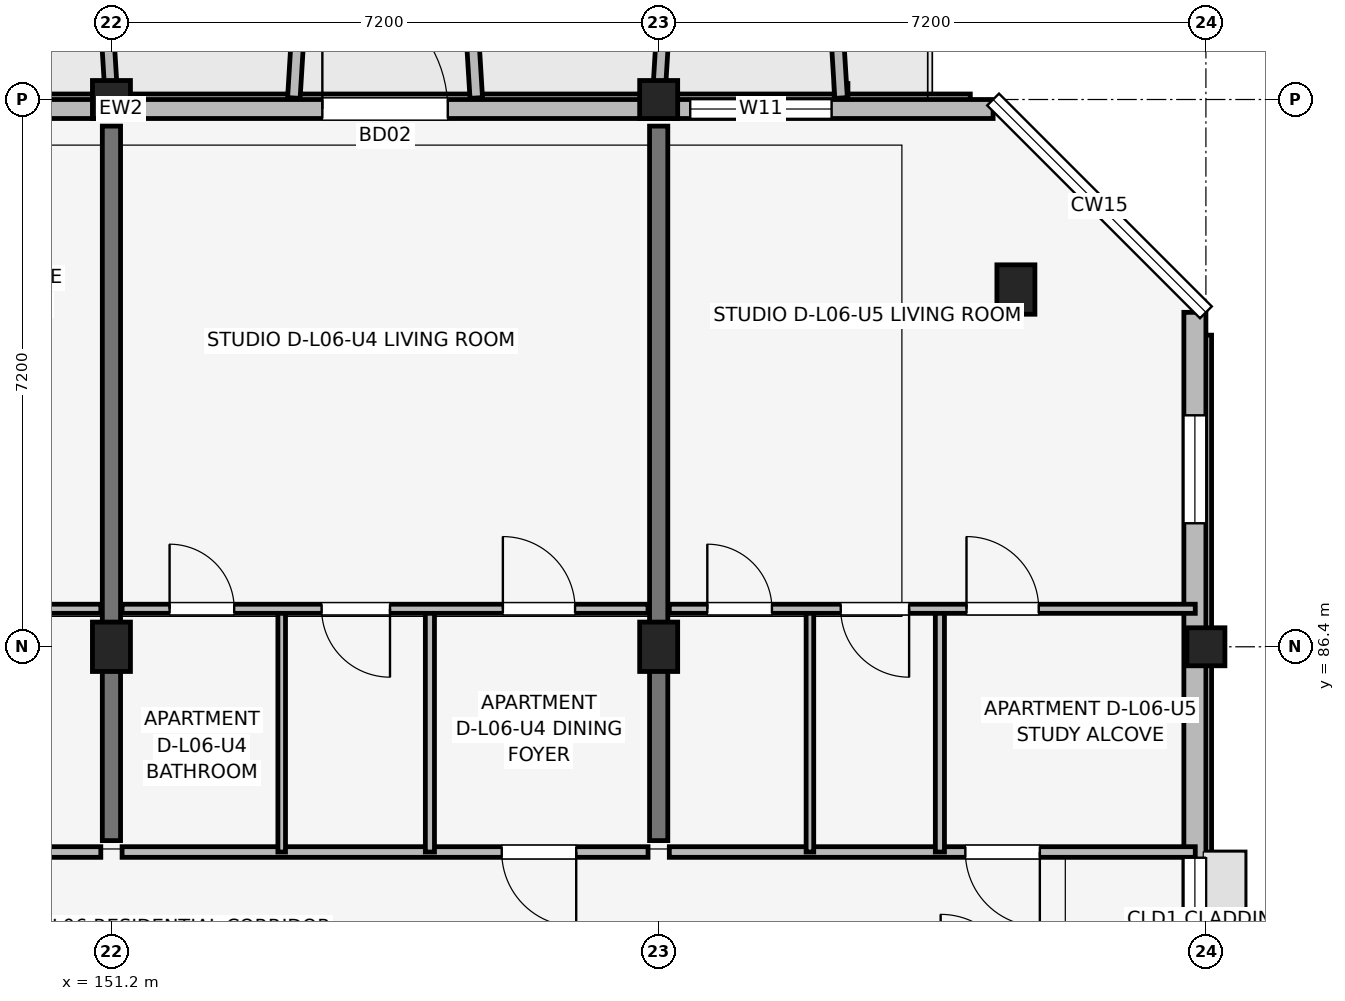
"""IFC4 building model, lengths in metres.
Left out: names, types, materials, properties, quantities, classifications, styles, units other than length and angle.
Written with IfcOpenShell. Run it as: python <this file> out.ifc"""

import sys

from ifc_helpers import new_model, si_unit, direction, frame, frame_2d, origin, origin_2d, place, context, subcontext, project, spatial, rectangle, extrude, element, fill, save


model = new_model("IFC4")
c1 = context("Model", 3, precision=1e-05, world=origin(), true_north=direction((0.0, 1.0)))
c2 = subcontext(c1, "Body", "Model", "MODEL_VIEW")
j1 = project(units=[si_unit("LENGTHUNIT", "METRE"), si_unit("PLANEANGLEUNIT", "RADIAN")], contexts=[c1])
p1 = place(None, origin())
s1 = spatial("IfcSite", under=j1, at=p1, CompositionType="ELEMENT")
p2 = place(p1, origin())
s2 = spatial("IfcBuilding", under=s1, at=p2, CompositionType="ELEMENT")
p3 = place(p2, frame((0.0, 0.0, 21.3)))
s3 = spatial("IfcBuildingStorey", under=s2, at=p3, CompositionType="ELEMENT", Elevation=21.3)
p4 = place(p3, frame((151.2, 86.4, 0.0), z_axis=(0.0, 0.0, 1.0), x_axis=(1.0, 0.0, 0.0)))
e1 = element("IfcColumn", 1, at=p4, inside=s3, PredefinedType="COLUMN", context=c2, shape_type="SweptSolid", body=[
    extrude(rectangle(XDim=0.5, YDim=0.65, at=origin_2d()), origin(), (0.0, 0.0, 1.0), 3.15),
])
p5 = place(p3, frame((151.2, 93.6, 0.0), z_axis=(0.0, 0.0, 1.0), x_axis=(1.0, 0.0, 0.0)))
e2 = element("IfcColumn", 2, at=p5, inside=s3, PredefinedType="COLUMN", context=c2, shape_type="SweptSolid", body=[
    extrude(rectangle(XDim=0.5, YDim=0.5, at=origin_2d()), origin(), (0.0, 0.0, 1.0), 3.15),
])
p6 = place(p3, frame((158.4, 86.4, 0.0), z_axis=(0.0, 0.0, 1.0), x_axis=(1.0, 0.0, 0.0)))
e3 = element("IfcColumn", 3, at=p6, inside=s3, PredefinedType="COLUMN", context=c2, shape_type="SweptSolid", body=[
    extrude(rectangle(XDim=0.5, YDim=0.65, at=origin_2d()), origin(), (0.0, 0.0, 1.0), 3.15),
])
for number, where, z_axis, x_axis in (
    (4, (158.4, 93.6, 0.0), (0.0, 0.0, 1.0), (1.0, 0.0, 0.0)),
    (5, (165.6, 86.4, 0.0), (0.0, 0.0, 1.0), (1.0, 0.0, 0.0)),
):
    element("IfcColumn", number, at=place(p3, frame(where, z_axis=z_axis, x_axis=x_axis)), inside=s3, PredefinedType="COLUMN", context=c2, shape_type="SweptSolid", body=[
        extrude(rectangle(XDim=0.5, YDim=0.5, at=origin_2d()), origin(), (0.0, 0.0, 1.0), 3.15),
    ])
p7 = place(p3, frame((163.1, 91.1, 0.0), z_axis=(0.0, 0.0, 1.0), x_axis=(1.0, 0.0, 0.0)))
e6 = element("IfcColumn", 6, at=p7, inside=s3, PredefinedType="COLUMN", context=c2, shape_type="SweptSolid", body=[
    extrude(rectangle(XDim=0.5, YDim=0.65, at=origin_2d()), origin(), (0.0, 0.0, 1.0), 3.15),
])
for number, where, z_axis, x_axis in (
    (7, (151.2, 83.85, 0.0), (0.0, 0.0, 1.0), (0.0, 1.0, 0.0)),
    (8, (158.4, 83.85, 0.0), (0.0, 0.0, 1.0), (0.0, 1.0, 0.0)),
):
    element("IfcWall", number, at=place(p3, frame(where, z_axis=z_axis, x_axis=x_axis)), inside=s3, PredefinedType="SHEAR", context=c2, shape_type="SweptSolid", body=[
        extrude(rectangle(XDim=9.4, YDim=0.24, at=frame_2d((4.7, 0.0))), origin(), (0.0, 0.0, 1.0), 3.15),
    ])
p8 = place(p3, frame((165.455, 74.8, 0.0), z_axis=(0.0, 0.0, 1.0), x_axis=(0.0, 1.0, 0.0)))
e9 = element("IfcWall", 9, at=p8, inside=s3, PredefinedType="SOLIDWALL", context=c2, shape_type="SweptSolid", body=[
    extrude(rectangle(XDim=16.0, YDim=0.29, at=frame_2d((8.0, 0.0))), origin(), (0.0, 0.0, 1.0), 2.43),
])
p9 = place(p8, frame((7.175, 0.0, 1.05)))
e10 = element("IfcOpeningElement", 10, at=p9, cuts=e9, PredefinedType="OPENING", context=c2, shape_type="SweptSolid", body=[
    extrude(rectangle(XDim=1.65, YDim=1.15, at=frame_2d((0.825, 0.575))), frame((0.0, 0.155, 0.0), z_axis=(0.0, -1.0, 0.0), x_axis=(1.0, 0.0, 0.0)), (0.0, 0.0, 1.0), 0.31),
])
p10 = place(p8, frame((13.225, 0.0, 0.72)))
e11 = element("IfcOpeningElement", 11, at=p10, cuts=e9, PredefinedType="OPENING", context=c2, shape_type="SweptSolid", body=[
    extrude(rectangle(XDim=1.42, YDim=1.6, at=frame_2d((0.71, 0.8))), frame((0.0, 0.155, 0.0), z_axis=(0.0, -1.0, 0.0), x_axis=(1.0, 0.0, 0.0)), (0.0, 0.0, 1.0), 0.31),
])
p11 = place(p3, frame((162.8, 93.475, 0.0), z_axis=(0.0, 0.0, 1.0), x_axis=(-1.0, 0.0, 0.0)))
e12 = element("IfcWall", 12, at=p11, inside=s3, PredefinedType="SOLIDWALL", context=c2, shape_type="SweptSolid", body=[
    extrude(rectangle(XDim=30.4, YDim=0.25, at=frame_2d((15.2, 0.0))), origin(), (0.0, 0.0, 1.0), 2.43),
])
p12 = place(p11, frame((23.3, 0.0, 0.0), z_axis=(0.0, 0.0, 1.0), x_axis=(-1.0, 0.0, 0.0)))
e13 = element("IfcOpeningElement", 13, at=p12, cuts=e12, PredefinedType="OPENING", context=c2, shape_type="SweptSolid", body=[
    extrude(rectangle(XDim=1.8, YDim=2.15, at=frame_2d((0.9, 1.075))), frame((0.0, 0.135, 0.0), z_axis=(0.0, -1.0, 0.0), x_axis=(1.0, 0.0, 0.0)), (0.0, 0.0, 1.0), 0.27),
])
p13 = place(p11, frame((8.825, 0.0, 0.0), z_axis=(0.0, 0.0, 1.0), x_axis=(-1.0, 0.0, 0.0)))
e14 = element("IfcOpeningElement", 14, at=p13, cuts=e12, PredefinedType="OPENING", context=c2, shape_type="SweptSolid", body=[
    extrude(rectangle(XDim=1.65, YDim=2.15, at=frame_2d((0.825, 1.075))), frame((0.0, 0.135, 0.0), z_axis=(0.0, -1.0, 0.0), x_axis=(1.0, 0.0, 0.0)), (0.0, 0.0, 1.0), 0.27),
])
p14 = place(p11, frame((26.985, 0.0, 0.75)))
e15 = element("IfcOpeningElement", 15, at=p14, cuts=e12, PredefinedType="OPENING", context=c2, shape_type="SweptSolid", body=[
    extrude(rectangle(XDim=0.72, YDim=1.35, at=frame_2d((0.36, 0.675))), frame((0.0, 0.135, 0.0), z_axis=(0.0, -1.0, 0.0), x_axis=(1.0, 0.0, 0.0)), (0.0, 0.0, 1.0), 0.27),
])
p15 = place(p11, frame((17.115, 0.0, 0.75)))
e16 = element("IfcOpeningElement", 16, at=p15, cuts=e12, PredefinedType="OPENING", context=c2, shape_type="SweptSolid", body=[
    extrude(rectangle(XDim=0.85, YDim=1.4, at=frame_2d((0.425, 0.7))), frame((0.0, 0.135, 0.0), z_axis=(0.0, -1.0, 0.0), x_axis=(1.0, 0.0, 0.0)), (0.0, 0.0, 1.0), 0.27),
])
p16 = place(p11, frame((14.125, 0.0, 0.67)))
e17 = element("IfcOpeningElement", 17, at=p16, cuts=e12, PredefinedType="OPENING", context=c2, shape_type="SweptSolid", body=[
    extrude(rectangle(XDim=2.15, YDim=1.65, at=frame_2d((1.075, 0.825))), frame((0.0, 0.135, 0.0), z_axis=(0.0, -1.0, 0.0), x_axis=(1.0, 0.0, 0.0)), (0.0, 0.0, 1.0), 0.27),
])
p17 = place(p11, frame((2.125, 0.0, 0.7)))
e18 = element("IfcOpeningElement", 18, at=p17, cuts=e12, PredefinedType="OPENING", context=c2, shape_type="SweptSolid", body=[
    extrude(rectangle(XDim=1.86, YDim=1.6, at=frame_2d((0.93, 0.8))), frame((0.0, 0.135, 0.0), z_axis=(0.0, -1.0, 0.0), x_axis=(1.0, 0.0, 0.0)), (0.0, 0.0, 1.0), 0.27),
])
p18 = place(p3, frame((151.2, 93.62, 0.0), z_axis=(0.0, 0.0, 1.0), x_axis=(-0.061046865508, 0.998134900808, 0.0)))
e19 = element("IfcWall", 19, at=p18, inside=s3, PredefinedType="ELEMENTEDWALL", context=c2, shape_type="SweptSolid", body=[
    extrude(rectangle(XDim=1.964, YDim=0.165, at=frame_2d((0.982, 0.0))), origin(), (0.0, 0.0, 1.0), 2.95),
])
for number, where, z_axis, x_axis in (
    (20, (153.6, 93.62, 0.0), (0.0, 0.0, 1.0), (0.061, 0.998, 0.0)),
    (21, (156.0, 93.62, 0.0), (0.0, 0.0, 1.0), (-0.061, 0.998, 0.0)),
):
    element("IfcWall", number, at=place(p3, frame(where, z_axis=z_axis, x_axis=x_axis)), inside=s3, PredefinedType="ELEMENTEDWALL", context=c2, shape_type="SweptSolid", body=[
        extrude(rectangle(XDim=1.964, YDim=0.165, at=frame_2d((0.982, 0.0))), origin(), (0.0, 0.0, 1.0), 2.48),
    ])
for number, where, z_axis, x_axis in (
    (22, (158.4, 93.62, 0.0), (0.0, 0.0, 1.0), (0.061, 0.998, 0.0)),
    (23, (160.8, 93.62, 0.0), (0.0, 0.0, 1.0), (-0.061, 0.998, 0.0)),
):
    element("IfcWall", number, at=place(p3, frame(where, z_axis=z_axis, x_axis=x_axis)), inside=s3, PredefinedType="ELEMENTEDWALL", context=c2, shape_type="SweptSolid", body=[
        extrude(rectangle(XDim=1.964, YDim=0.165, at=frame_2d((0.982, 0.0))), origin(), (0.0, 0.0, 1.0), 2.95),
    ])
p19 = place(p3, frame((144.14, 83.7, 0.0), z_axis=(0.0, 0.0, 1.0), x_axis=(1.0, 0.0, 0.0)))
e24 = element("IfcWall", 24, at=p19, inside=s3, PredefinedType="PARTITIONING", context=c2, shape_type="SweptSolid", body=[
    extrude(rectangle(XDim=6.92, YDim=0.14, at=frame_2d((3.46, 0.0))), origin(), (0.0, 0.0, 1.0), 2.38),
])
p20 = place(p19, frame((5.145, 0.0, 0.0)))
e25 = element("IfcOpeningElement", 25, at=p20, cuts=e24, PredefinedType="OPENING", context=c2, shape_type="SweptSolid", body=[
    extrude(rectangle(XDim=0.98, YDim=2.1, at=frame_2d((0.49, 1.05))), frame((0.0, 0.08, 0.0), z_axis=(0.0, -1.0, 0.0), x_axis=(1.0, 0.0, 0.0)), (0.0, 0.0, 1.0), 0.16),
])
p21 = place(p3, frame((144.14, 86.9, 0.0), z_axis=(0.0, 0.0, 1.0), x_axis=(1.0, 0.0, 0.0)))
e26 = element("IfcWall", 26, at=p21, inside=s3, PredefinedType="PARTITIONING", context=c2, shape_type="SweptSolid", body=[
    extrude(rectangle(XDim=6.92, YDim=0.12, at=frame_2d((3.46, 0.0))), origin(), (0.0, 0.0, 1.0), 2.38),
])
p22 = place(p21, frame((1.475, 0.0, 0.0), z_axis=(0.0, 0.0, 1.0), x_axis=(-1.0, 0.0, 0.0)))
e27 = element("IfcOpeningElement", 27, at=p22, cuts=e26, PredefinedType="OPENING", context=c2, shape_type="SweptSolid", body=[
    extrude(rectangle(XDim=0.85, YDim=2.08, at=frame_2d((0.425, 1.04))), frame((0.0, 0.07, 0.0), z_axis=(0.0, -1.0, 0.0), x_axis=(1.0, 0.0, 0.0)), (0.0, 0.0, 1.0), 0.14),
])
p23 = place(p21, frame((2.775, 0.0, 0.0)))
e28 = element("IfcOpeningElement", 28, at=p23, cuts=e26, PredefinedType="OPENING", context=c2, shape_type="SweptSolid", body=[
    extrude(rectangle(XDim=0.9, YDim=2.08, at=frame_2d((0.45, 1.04))), frame((0.0, 0.07, 0.0), z_axis=(0.0, -1.0, 0.0), x_axis=(1.0, 0.0, 0.0)), (0.0, 0.0, 1.0), 0.14),
])
p24 = place(p21, frame((6.11, 0.0, 0.0), z_axis=(0.0, 0.0, 1.0), x_axis=(-1.0, 0.0, 0.0)))
e29 = element("IfcOpeningElement", 29, at=p24, cuts=e26, PredefinedType="OPENING", context=c2, shape_type="SweptSolid", body=[
    extrude(rectangle(XDim=0.95, YDim=2.08, at=frame_2d((0.475, 1.04))), frame((0.0, 0.07, 0.0), z_axis=(0.0, -1.0, 0.0), x_axis=(1.0, 0.0, 0.0)), (0.0, 0.0, 1.0), 0.14),
])
p25 = place(p3, frame((151.34, 83.7, 0.0), z_axis=(0.0, 0.0, 1.0), x_axis=(1.0, 0.0, 0.0)))
e30 = element("IfcWall", 30, at=p25, inside=s3, PredefinedType="PARTITIONING", context=c2, shape_type="SweptSolid", body=[
    extrude(rectangle(XDim=6.92, YDim=0.14, at=frame_2d((3.46, 0.0))), origin(), (0.0, 0.0, 1.0), 2.38),
])
p26 = place(p25, frame((5.975, 0.0, 0.0), z_axis=(0.0, 0.0, 1.0), x_axis=(-1.0, 0.0, 0.0)))
e31 = element("IfcOpeningElement", 31, at=p26, cuts=e30, PredefinedType="OPENING", context=c2, shape_type="SweptSolid", body=[
    extrude(rectangle(XDim=0.98, YDim=2.1, at=frame_2d((0.49, 1.05))), frame((0.0, 0.08, 0.0), z_axis=(0.0, -1.0, 0.0), x_axis=(1.0, 0.0, 0.0)), (0.0, 0.0, 1.0), 0.16),
])
p27 = place(p3, frame((153.44, 83.7, 0.0), z_axis=(0.0, 0.0, 1.0), x_axis=(0.0, 1.0, 0.0)))
e32 = element("IfcWall", 32, at=p27, inside=s3, PredefinedType="PARTITIONING", context=c2, shape_type="SweptSolid", body=[
    extrude(rectangle(XDim=3.2, YDim=0.1, at=frame_2d((1.6, 0.0))), origin(), (0.0, 0.0, 1.0), 2.38),
])
p28 = place(p3, frame((155.39, 83.7, 0.0), z_axis=(0.0, 0.0, 1.0), x_axis=(0.0, 1.0, 0.0)))
e33 = element("IfcWall", 33, at=p28, inside=s3, PredefinedType="PARTITIONING", context=c2, shape_type="SweptSolid", body=[
    extrude(rectangle(XDim=3.2, YDim=0.12, at=frame_2d((1.6, 0.0))), origin(), (0.0, 0.0, 1.0), 2.38),
])
p29 = place(p3, frame((151.34, 86.9, 0.0), z_axis=(0.0, 0.0, 1.0), x_axis=(1.0, 0.0, 0.0)))
e34 = element("IfcWall", 34, at=p29, inside=s3, PredefinedType="PARTITIONING", context=c2, shape_type="SweptSolid", body=[
    extrude(rectangle(XDim=6.92, YDim=0.12, at=frame_2d((3.46, 0.0))), origin(), (0.0, 0.0, 1.0), 2.38),
])
p30 = place(p29, frame((0.625, 0.0, 0.0)))
e35 = element("IfcOpeningElement", 35, at=p30, cuts=e34, PredefinedType="OPENING", context=c2, shape_type="SweptSolid", body=[
    extrude(rectangle(XDim=0.85, YDim=2.08, at=frame_2d((0.425, 1.04))), frame((0.0, 0.07, 0.0), z_axis=(0.0, -1.0, 0.0), x_axis=(1.0, 0.0, 0.0)), (0.0, 0.0, 1.0), 0.14),
])
p31 = place(p29, frame((3.525, 0.0, 0.0), z_axis=(0.0, 0.0, 1.0), x_axis=(-1.0, 0.0, 0.0)))
e36 = element("IfcOpeningElement", 36, at=p31, cuts=e34, PredefinedType="OPENING", context=c2, shape_type="SweptSolid", body=[
    extrude(rectangle(XDim=0.9, YDim=2.08, at=frame_2d((0.45, 1.04))), frame((0.0, 0.07, 0.0), z_axis=(0.0, -1.0, 0.0), x_axis=(1.0, 0.0, 0.0)), (0.0, 0.0, 1.0), 0.14),
])
p32 = place(p29, frame((5.01, 0.0, 0.0)))
e37 = element("IfcOpeningElement", 37, at=p32, cuts=e34, PredefinedType="OPENING", context=c2, shape_type="SweptSolid", body=[
    extrude(rectangle(XDim=0.95, YDim=2.08, at=frame_2d((0.475, 1.04))), frame((0.0, 0.07, 0.0), z_axis=(0.0, -1.0, 0.0), x_axis=(1.0, 0.0, 0.0)), (0.0, 0.0, 1.0), 0.14),
])
p33 = place(p3, frame((158.54, 83.7, 0.0), z_axis=(0.0, 0.0, 1.0), x_axis=(1.0, 0.0, 0.0)))
e38 = element("IfcWall", 38, at=p33, inside=s3, PredefinedType="PARTITIONING", context=c2, shape_type="SweptSolid", body=[
    extrude(rectangle(XDim=6.92, YDim=0.14, at=frame_2d((3.46, 0.0))), origin(), (0.0, 0.0, 1.0), 2.38),
])
p34 = place(p33, frame((4.875, 0.0, 0.0), z_axis=(0.0, 0.0, 1.0), x_axis=(-1.0, 0.0, 0.0)))
e39 = element("IfcOpeningElement", 39, at=p34, cuts=e38, PredefinedType="OPENING", context=c2, shape_type="SweptSolid", body=[
    extrude(rectangle(XDim=0.98, YDim=2.1, at=frame_2d((0.49, 1.05))), frame((0.0, 0.08, 0.0), z_axis=(0.0, -1.0, 0.0), x_axis=(1.0, 0.0, 0.0)), (0.0, 0.0, 1.0), 0.16),
])
p35 = place(p3, frame((160.39, 83.7, 0.0), z_axis=(0.0, 0.0, 1.0), x_axis=(0.0, 1.0, 0.0)))
e40 = element("IfcWall", 40, at=p35, inside=s3, PredefinedType="PARTITIONING", context=c2, shape_type="SweptSolid", body=[
    extrude(rectangle(XDim=3.2, YDim=0.1, at=frame_2d((1.6, 0.0))), origin(), (0.0, 0.0, 1.0), 2.38),
])
p36 = place(p3, frame((162.1, 83.7, 0.0), z_axis=(0.0, 0.0, 1.0), x_axis=(0.0, 1.0, 0.0)))
e41 = element("IfcWall", 41, at=p36, inside=s3, PredefinedType="PARTITIONING", context=c2, shape_type="SweptSolid", body=[
    extrude(rectangle(XDim=3.2, YDim=0.12, at=frame_2d((1.6, 0.0))), origin(), (0.0, 0.0, 1.0), 2.38),
])
p37 = place(p3, frame((158.54, 86.9, 0.0), z_axis=(0.0, 0.0, 1.0), x_axis=(1.0, 0.0, 0.0)))
e42 = element("IfcWall", 42, at=p37, inside=s3, PredefinedType="PARTITIONING", context=c2, shape_type="SweptSolid", body=[
    extrude(rectangle(XDim=6.92, YDim=0.12, at=frame_2d((3.46, 0.0))), origin(), (0.0, 0.0, 1.0), 2.38),
])
p38 = place(p37, frame((0.5, 0.0, 0.0)))
e43 = element("IfcOpeningElement", 43, at=p38, cuts=e42, PredefinedType="OPENING", context=c2, shape_type="SweptSolid", body=[
    extrude(rectangle(XDim=0.85, YDim=2.08, at=frame_2d((0.425, 1.04))), frame((0.0, 0.07, 0.0), z_axis=(0.0, -1.0, 0.0), x_axis=(1.0, 0.0, 0.0)), (0.0, 0.0, 1.0), 0.14),
])
p39 = place(p37, frame((3.155, 0.0, 0.0), z_axis=(0.0, 0.0, 1.0), x_axis=(-1.0, 0.0, 0.0)))
e44 = element("IfcOpeningElement", 44, at=p39, cuts=e42, PredefinedType="OPENING", context=c2, shape_type="SweptSolid", body=[
    extrude(rectangle(XDim=0.9, YDim=2.08, at=frame_2d((0.45, 1.04))), frame((0.0, 0.07, 0.0), z_axis=(0.0, -1.0, 0.0), x_axis=(1.0, 0.0, 0.0)), (0.0, 0.0, 1.0), 0.14),
])
p40 = place(p37, frame((3.91, 0.0, 0.0)))
e45 = element("IfcOpeningElement", 45, at=p40, cuts=e42, PredefinedType="OPENING", context=c2, shape_type="SweptSolid", body=[
    extrude(rectangle(XDim=0.95, YDim=2.08, at=frame_2d((0.475, 1.04))), frame((0.0, 0.07, 0.0), z_axis=(0.0, -1.0, 0.0), x_axis=(1.0, 0.0, 0.0)), (0.0, 0.0, 1.0), 0.14),
])
p41 = place(p13, origin())
e46 = element("IfcDoor", 46, at=p41, inside=s3, OperationType="SINGLE_SWING_RIGHT", PredefinedType="DOOR", context=c2, shape_type="SweptSolid", body=[
    extrude(rectangle(XDim=1.65, YDim=2.15, at=frame_2d((0.825, 1.075))), frame((0.0, 0.025, 0.0), z_axis=(0.0, -1.0, 0.0), x_axis=(1.0, 0.0, 0.0)), (0.0, 0.0, 1.0), 0.05),
])
fill(e14, e46)
p42 = place(p17, origin())
e47 = element("IfcWindow", 47, at=p42, inside=s3, PartitioningType="SINGLE_PANEL", PredefinedType="WINDOW", context=c2, shape_type="SweptSolid", body=[
    extrude(rectangle(XDim=1.86, YDim=1.6, at=frame_2d((0.93, 0.8))), frame((0.0, 0.03, 0.0), z_axis=(0.0, -1.0, 0.0), x_axis=(1.0, 0.0, 0.0)), (0.0, 0.0, 1.0), 0.06),
])
fill(e18, e47)
p43 = place(p9, origin())
e48 = element("IfcWindow", 48, at=p43, inside=s3, PartitioningType="SINGLE_PANEL", PredefinedType="WINDOW", context=c2, shape_type="SweptSolid", body=[
    extrude(rectangle(XDim=1.65, YDim=1.15, at=frame_2d((0.825, 0.575))), frame((0.0, 0.03, 0.0), z_axis=(0.0, -1.0, 0.0), x_axis=(1.0, 0.0, 0.0)), (0.0, 0.0, 1.0), 0.06),
])
fill(e10, e48)
p44 = place(p10, origin())
e49 = element("IfcWindow", 49, at=p44, inside=s3, PartitioningType="SINGLE_PANEL", PredefinedType="WINDOW", context=c2, shape_type="SweptSolid", body=[
    extrude(rectangle(XDim=1.42, YDim=1.6, at=frame_2d((0.71, 0.8))), frame((0.0, 0.03, 0.0), z_axis=(0.0, -1.0, 0.0), x_axis=(1.0, 0.0, 0.0)), (0.0, 0.0, 1.0), 0.06),
])
fill(e11, e49)
p45 = place(p26, origin())
e50 = element("IfcDoor", 50, at=p45, inside=s3, OperationType="SINGLE_SWING_RIGHT", PredefinedType="DOOR", context=c2, shape_type="SweptSolid", body=[
    extrude(rectangle(XDim=0.98, YDim=2.1, at=frame_2d((0.49, 1.05))), frame((0.0, 0.025, 0.0), z_axis=(0.0, -1.0, 0.0), x_axis=(1.0, 0.0, 0.0)), (0.0, 0.0, 1.0), 0.05),
])
fill(e31, e50)
p46 = place(p30, origin())
e51 = element("IfcDoor", 51, at=p46, inside=s3, OperationType="SINGLE_SWING_LEFT", PredefinedType="DOOR", context=c2, shape_type="SweptSolid", body=[
    extrude(rectangle(XDim=0.85, YDim=2.08, at=frame_2d((0.425, 1.04))), frame((0.0, 0.025, 0.0), z_axis=(0.0, -1.0, 0.0), x_axis=(1.0, 0.0, 0.0)), (0.0, 0.0, 1.0), 0.05),
])
fill(e35, e51)
p47 = place(p31, origin())
e52 = element("IfcDoor", 52, at=p47, inside=s3, OperationType="SINGLE_SWING_RIGHT", PredefinedType="DOOR", context=c2, shape_type="SweptSolid", body=[
    extrude(rectangle(XDim=0.9, YDim=2.08, at=frame_2d((0.45, 1.04))), frame((0.0, 0.025, 0.0), z_axis=(0.0, -1.0, 0.0), x_axis=(1.0, 0.0, 0.0)), (0.0, 0.0, 1.0), 0.05),
])
fill(e36, e52)
p48 = place(p32, origin())
e53 = element("IfcDoor", 53, at=p48, inside=s3, OperationType="SINGLE_SWING_LEFT", PredefinedType="DOOR", context=c2, shape_type="SweptSolid", body=[
    extrude(rectangle(XDim=0.95, YDim=2.08, at=frame_2d((0.475, 1.04))), frame((0.0, 0.025, 0.0), z_axis=(0.0, -1.0, 0.0), x_axis=(1.0, 0.0, 0.0)), (0.0, 0.0, 1.0), 0.05),
])
fill(e37, e53)
p49 = place(p34, origin())
e54 = element("IfcDoor", 54, at=p49, inside=s3, OperationType="SINGLE_SWING_RIGHT", PredefinedType="DOOR", context=c2, shape_type="SweptSolid", body=[
    extrude(rectangle(XDim=0.98, YDim=2.1, at=frame_2d((0.49, 1.05))), frame((0.0, 0.025, 0.0), z_axis=(0.0, -1.0, 0.0), x_axis=(1.0, 0.0, 0.0)), (0.0, 0.0, 1.0), 0.05),
])
fill(e39, e54)
p50 = place(p38, origin())
e55 = element("IfcDoor", 55, at=p50, inside=s3, OperationType="SINGLE_SWING_LEFT", PredefinedType="DOOR", context=c2, shape_type="SweptSolid", body=[
    extrude(rectangle(XDim=0.85, YDim=2.08, at=frame_2d((0.425, 1.04))), frame((0.0, 0.025, 0.0), z_axis=(0.0, -1.0, 0.0), x_axis=(1.0, 0.0, 0.0)), (0.0, 0.0, 1.0), 0.05),
])
fill(e43, e55)
p51 = place(p39, origin())
e56 = element("IfcDoor", 56, at=p51, inside=s3, OperationType="SINGLE_SWING_RIGHT", PredefinedType="DOOR", context=c2, shape_type="SweptSolid", body=[
    extrude(rectangle(XDim=0.9, YDim=2.08, at=frame_2d((0.45, 1.04))), frame((0.0, 0.025, 0.0), z_axis=(0.0, -1.0, 0.0), x_axis=(1.0, 0.0, 0.0)), (0.0, 0.0, 1.0), 0.05),
])
fill(e44, e56)
p52 = place(p40, origin())
e57 = element("IfcDoor", 57, at=p52, inside=s3, OperationType="SINGLE_SWING_LEFT", PredefinedType="DOOR", context=c2, shape_type="SweptSolid", body=[
    extrude(rectangle(XDim=0.95, YDim=2.08, at=frame_2d((0.475, 1.04))), frame((0.0, 0.025, 0.0), z_axis=(0.0, -1.0, 0.0), x_axis=(1.0, 0.0, 0.0)), (0.0, 0.0, 1.0), 0.05),
])
fill(e45, e57)
save(model, sys.argv[1])
